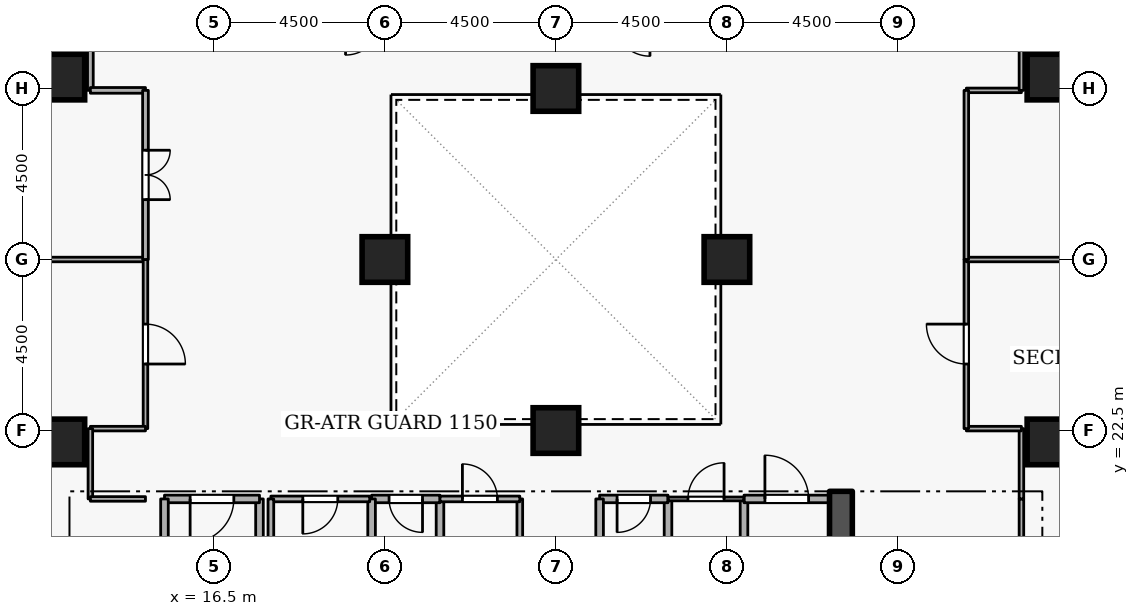
"""IFC4 building model, lengths in metres.
Left out: names, types, materials, properties, quantities, classifications, styles, units other than length and angle.
Written with IfcOpenShell. Run it as: python <this file> out.ifc"""

import sys

from ifc_helpers import new_model, si_unit, direction, frame, frame_2d, origin, origin_2d, place, context, subcontext, project, spatial, rectangle, extrude, element, fill, save


model = new_model("IFC4")
c1 = context("Model", 3, precision=1e-05, world=origin(), true_north=direction((0.0, 1.0)))
c2 = subcontext(c1, "Body", "Model", "MODEL_VIEW")
j1 = project(units=[si_unit("LENGTHUNIT", "METRE"), si_unit("PLANEANGLEUNIT", "RADIAN")], contexts=[c1])
p1 = place(None, origin())
s1 = spatial("IfcSite", under=j1, at=p1, CompositionType="ELEMENT")
p2 = place(p1, origin())
s2 = spatial("IfcBuilding", under=s1, at=p2, CompositionType="ELEMENT")
p3 = place(p2, frame((0.0, 0.0, 105.3)))
s3 = spatial("IfcBuildingStorey", under=s2, at=p3, CompositionType="ELEMENT", Elevation=105.3)
p4 = place(p3, frame((33.0, 15.2, 0.0), z_axis=(0.0, 0.0, 1.0), x_axis=(0.0, 1.0, 0.0)))
e1 = element("IfcWall", 1, at=p4, inside=s3, PredefinedType="SHEAR", context=c2, shape_type="SweptSolid", body=[
    extrude(rectangle(XDim=5.7, YDim=0.6, at=frame_2d((2.85, 0.0))), origin(), (0.0, 0.0, 1.0), 3.6),
])
for number, where, z_axis, x_axis in (
    (2, (12.5, 22.2, 0.0), (0.0, 0.0, 1.0), (1.0, 0.0, 0.0)),
    (3, (38.5, 22.2, 0.0), (0.0, 0.0, 1.0), (1.0, 0.0, 0.0)),
    (4, (12.5, 31.8, 0.0), (0.0, 0.0, 1.0), (1.0, 0.0, 0.0)),
    (5, (38.5, 31.8, 0.0), (0.0, 0.0, 1.0), (1.0, 0.0, 0.0)),
    (6, (25.5, 22.5, 0.0), (0.0, 0.0, 1.0), (1.0, 0.0, 0.0)),
    (7, (25.5, 31.5, 0.0), (0.0, 0.0, 1.0), (1.0, 0.0, 0.0)),
    (8, (21.0, 27.0, 0.0), (0.0, 0.0, 1.0), (1.0, 0.0, 0.0)),
    (9, (30.0, 27.0, 0.0), (0.0, 0.0, 1.0), (1.0, 0.0, 0.0)),
):
    element("IfcColumn", number, at=place(p3, frame(where, z_axis=z_axis, x_axis=x_axis)), inside=s3, PredefinedType="COLUMN", context=c2, shape_type="SweptSolid", body=[
        extrude(rectangle(XDim=1.2, YDim=1.2, at=origin_2d()), origin(), (0.0, 0.0, 1.0), 3.6),
    ])
p5 = place(p3, frame((17.7, 18.4, 0.0), z_axis=(0.0, 0.0, 1.0), x_axis=(0.0, 1.0, 0.0)))
e10 = element("IfcWall", 10, at=p5, inside=s3, PredefinedType="STANDARD", context=c2, shape_type="SweptSolid", body=[
    extrude(rectangle(XDim=2.3, YDim=0.2, at=frame_2d((1.15, 0.0))), origin(), (0.0, 0.0, 1.0), 2.545),
])
p6 = place(p3, frame((17.7, 20.7, 0.0), z_axis=(0.0, 0.0, 1.0), x_axis=(-1.0, 0.0, 0.0)))
e11 = element("IfcWall", 11, at=p6, inside=s3, PredefinedType="STANDARD", context=c2, shape_type="SweptSolid", body=[
    extrude(rectangle(XDim=2.5, YDim=0.2, at=frame_2d((1.25, 0.0))), origin(), (0.0, 0.0, 1.0), 3.34),
])
p7 = place(p6, frame((0.675, 0.0, 0.0)))
e12 = element("IfcOpeningElement", 12, at=p7, cuts=e11, PredefinedType="OPENING", context=c2, shape_type="SweptSolid", body=[
    extrude(rectangle(XDim=1.15, YDim=2.1, at=frame_2d((0.575, 1.05))), frame((0.0, 0.11, 0.0), z_axis=(0.0, -1.0, 0.0), x_axis=(1.0, 0.0, 0.0)), (0.0, 0.0, 1.0), 0.22),
])
p8 = place(p3, frame((15.2, 20.7, 0.0), z_axis=(0.0, 0.0, 1.0), x_axis=(0.0, -1.0, 0.0)))
e13 = element("IfcWall", 13, at=p8, inside=s3, PredefinedType="STANDARD", context=c2, shape_type="SweptSolid", body=[
    extrude(rectangle(XDim=5.7, YDim=0.2, at=frame_2d((2.85, 0.0))), origin(), (0.0, 0.0, 1.0), 3.34),
])
p9 = place(p3, frame((28.45, 18.65, 0.0), z_axis=(0.0, 0.0, 1.0), x_axis=(0.0, 1.0, 0.0)))
e14 = element("IfcWall", 14, at=p9, inside=s3, PredefinedType="STANDARD", context=c2, shape_type="SweptSolid", body=[
    extrude(rectangle(XDim=2.05, YDim=0.2, at=frame_2d((1.025, 0.0))), origin(), (0.0, 0.0, 1.0), 3.34),
])
p10 = place(p3, frame((28.45, 20.7, 0.0), z_axis=(0.0, 0.0, 1.0), x_axis=(-1.0, 0.0, 0.0)))
e15 = element("IfcWall", 15, at=p10, inside=s3, PredefinedType="STANDARD", context=c2, shape_type="SweptSolid", body=[
    extrude(rectangle(XDim=1.8, YDim=0.2, at=frame_2d((0.9, 0.0))), origin(), (0.0, 0.0, 1.0), 3.34),
])
p11 = place(p10, frame((0.46, 0.0, 0.0)))
e16 = element("IfcOpeningElement", 16, at=p11, cuts=e15, PredefinedType="OPENING", context=c2, shape_type="SweptSolid", body=[
    extrude(rectangle(XDim=0.88, YDim=2.04, at=frame_2d((0.44, 1.02))), frame((0.0, 0.11, 0.0), z_axis=(0.0, -1.0, 0.0), x_axis=(1.0, 0.0, 0.0)), (0.0, 0.0, 1.0), 0.22),
])
for number, where, z_axis, x_axis in (
    (17, (26.65, 20.7, 0.0), (0.0, 0.0, 1.0), (0.0, -1.0, 0.0)),
    (18, (22.45, 18.65, 0.0), (0.0, 0.0, 1.0), (0.0, 1.0, 0.0)),
):
    element("IfcWall", number, at=place(p3, frame(where, z_axis=z_axis, x_axis=x_axis)), inside=s3, PredefinedType="STANDARD", context=c2, shape_type="SweptSolid", body=[
        extrude(rectangle(XDim=2.05, YDim=0.2, at=frame_2d((1.025, 0.0))), origin(), (0.0, 0.0, 1.0), 3.34),
    ])
p12 = place(p3, frame((22.45, 20.7, 0.0), z_axis=(0.0, 0.0, 1.0), x_axis=(-1.0, 0.0, 0.0)))
e19 = element("IfcWall", 19, at=p12, inside=s3, PredefinedType="STANDARD", context=c2, shape_type="SweptSolid", body=[
    extrude(rectangle(XDim=1.8, YDim=0.2, at=frame_2d((0.9, 0.0))), origin(), (0.0, 0.0, 1.0), 3.34),
])
p13 = place(p12, frame((0.46, 0.0, 0.0)))
e20 = element("IfcOpeningElement", 20, at=p13, cuts=e19, PredefinedType="OPENING", context=c2, shape_type="SweptSolid", body=[
    extrude(rectangle(XDim=0.88, YDim=2.04, at=frame_2d((0.44, 1.02))), frame((0.0, 0.11, 0.0), z_axis=(0.0, -1.0, 0.0), x_axis=(1.0, 0.0, 0.0)), (0.0, 0.0, 1.0), 0.22),
])
for number, where, z_axis, x_axis in (
    (21, (20.65, 20.7, 0.0), (0.0, 0.0, 1.0), (0.0, -1.0, 0.0)),
    (22, (30.45, 18.65, 0.0), (0.0, 0.0, 1.0), (0.0, 1.0, 0.0)),
):
    element("IfcWall", number, at=place(p3, frame(where, z_axis=z_axis, x_axis=x_axis)), inside=s3, PredefinedType="STANDARD", context=c2, shape_type="SweptSolid", body=[
        extrude(rectangle(XDim=2.05, YDim=0.2, at=frame_2d((1.025, 0.0))), origin(), (0.0, 0.0, 1.0), 3.34),
    ])
p14 = place(p3, frame((30.45, 20.7, 0.0), z_axis=(0.0, 0.0, 1.0), x_axis=(1.0, 0.0, 0.0)))
e23 = element("IfcWall", 23, at=p14, inside=s3, PredefinedType="STANDARD", context=c2, shape_type="SweptSolid", body=[
    extrude(rectangle(XDim=2.25, YDim=0.2, at=frame_2d((1.125, 0.0))), origin(), (0.0, 0.0, 1.0), 3.34),
])
p15 = place(p14, frame((0.55, 0.0, 0.0)))
e24 = element("IfcOpeningElement", 24, at=p15, cuts=e23, PredefinedType="OPENING", context=c2, shape_type="SweptSolid", body=[
    extrude(rectangle(XDim=1.15, YDim=2.1, at=frame_2d((0.575, 1.05))), frame((0.0, 0.11, 0.0), z_axis=(0.0, -1.0, 0.0), x_axis=(1.0, 0.0, 0.0)), (0.0, 0.0, 1.0), 0.22),
])
p16 = place(p3, frame((20.6, 20.7, 0.0), z_axis=(0.0, 0.0, 1.0), x_axis=(-1.0, 0.0, 0.0)))
e25 = element("IfcWall", 25, at=p16, inside=s3, PredefinedType="PARTITIONING", context=c2, shape_type="SweptSolid", body=[
    extrude(rectangle(XDim=2.6, YDim=0.15, at=frame_2d((1.3, 0.0))), origin(), (0.0, 0.0, 1.0), 3.34),
])
p17 = place(p16, frame((0.84, 0.0, 0.0)))
e26 = element("IfcOpeningElement", 26, at=p17, cuts=e25, PredefinedType="OPENING", context=c2, shape_type="SweptSolid", body=[
    extrude(rectangle(XDim=0.92, YDim=2.08, at=frame_2d((0.46, 1.04))), frame((0.0, 0.085, 0.0), z_axis=(0.0, -1.0, 0.0), x_axis=(1.0, 0.0, 0.0)), (0.0, 0.0, 1.0), 0.17),
])
p18 = place(p3, frame((18.0, 20.7, 0.0), z_axis=(0.0, 0.0, 1.0), x_axis=(0.0, -1.0, 0.0)))
e27 = element("IfcWall", 27, at=p18, inside=s3, PredefinedType="PARTITIONING", context=c2, shape_type="SweptSolid", body=[
    extrude(rectangle(XDim=2.05, YDim=0.15, at=frame_2d((1.025, 0.0))), origin(), (0.0, 0.0, 1.0), 2.545),
])
p19 = place(p3, frame((24.55, 20.7, 0.0), z_axis=(0.0, 0.0, 1.0), x_axis=(0.0, -1.0, 0.0)))
e28 = element("IfcWall", 28, at=p19, inside=s3, PredefinedType="PARTITIONING", context=c2, shape_type="SweptSolid", body=[
    extrude(rectangle(XDim=2.05, YDim=0.15, at=frame_2d((1.025, 0.0))), origin(), (0.0, 0.0, 1.0), 3.34),
])
p20 = place(p3, frame((22.45, 20.7, 0.0), z_axis=(0.0, 0.0, 1.0), x_axis=(1.0, 0.0, 0.0)))
e29 = element("IfcWall", 29, at=p20, inside=s3, PredefinedType="PARTITIONING", context=c2, shape_type="SweptSolid", body=[
    extrude(rectangle(XDim=2.1, YDim=0.15, at=frame_2d((1.05, 0.0))), origin(), (0.0, 0.0, 1.0), 3.34),
])
p21 = place(p20, frame((0.59, 0.0, 0.0)))
e30 = element("IfcOpeningElement", 30, at=p21, cuts=e29, PredefinedType="OPENING", context=c2, shape_type="SweptSolid", body=[
    extrude(rectangle(XDim=0.92, YDim=2.08, at=frame_2d((0.46, 1.04))), frame((0.0, 0.085, 0.0), z_axis=(0.0, -1.0, 0.0), x_axis=(1.0, 0.0, 0.0)), (0.0, 0.0, 1.0), 0.17),
])
p22 = place(p3, frame((28.45, 20.7, 0.0), z_axis=(0.0, 0.0, 1.0), x_axis=(1.0, 0.0, 0.0)))
e31 = element("IfcWall", 31, at=p22, inside=s3, PredefinedType="PARTITIONING", context=c2, shape_type="SweptSolid", body=[
    extrude(rectangle(XDim=2.0, YDim=0.1, at=frame_2d((1.0, 0.0))), origin(), (0.0, 0.0, 1.0), 3.34),
])
p23 = place(p22, frame((0.525, 0.0, 0.0)))
e32 = element("IfcOpeningElement", 32, at=p23, cuts=e31, PredefinedType="OPENING", context=c2, shape_type="SweptSolid", body=[
    extrude(rectangle(XDim=0.95, YDim=2.1, at=frame_2d((0.475, 1.05))), frame((0.0, 0.06, 0.0), z_axis=(0.0, -1.0, 0.0), x_axis=(1.0, 0.0, 0.0)), (0.0, 0.0, 1.0), 0.12),
])
p24 = place(p3, frame((1.58, 27.0, 0.0), z_axis=(0.0, 0.0, 1.0), x_axis=(1.0, 0.0, 0.0)))
e33 = element("IfcWall", 33, at=p24, inside=s3, PredefinedType="PARTITIONING", context=c2, shape_type="SweptSolid", body=[
    extrude(rectangle(XDim=13.12, YDim=0.12, at=frame_2d((6.56, 0.0))), origin(), (0.0, 0.0, 1.0), 2.878),
])
p25 = place(p3, frame((14.7, 27.0, 0.0), z_axis=(0.0, 0.0, 1.0), x_axis=(0.0, -1.0, 0.0)))
e34 = element("IfcWall", 34, at=p25, inside=s3, PredefinedType="PARTITIONING", context=c2, shape_type="SweptSolid", body=[
    extrude(rectangle(XDim=4.45, YDim=0.12, at=frame_2d((2.225, 0.0))), origin(), (0.0, 0.0, 1.0), 3.34),
])
p26 = place(p25, frame((1.7, 0.0, 0.0)))
e35 = element("IfcOpeningElement", 35, at=p26, cuts=e34, PredefinedType="OPENING", context=c2, shape_type="SweptSolid", body=[
    extrude(rectangle(XDim=1.05, YDim=2.1, at=frame_2d((0.525, 1.05))), frame((0.0, 0.07, 0.0), z_axis=(0.0, -1.0, 0.0), x_axis=(1.0, 0.0, 0.0)), (0.0, 0.0, 1.0), 0.14),
])
p27 = place(p3, frame((14.7, 22.55, 0.0), z_axis=(0.0, 0.0, 1.0), x_axis=(-1.0, 0.0, 0.0)))
e36 = element("IfcWall", 36, at=p27, inside=s3, PredefinedType="PARTITIONING", context=c2, shape_type="SweptSolid", body=[
    extrude(rectangle(XDim=1.45, YDim=0.12, at=frame_2d((0.725, 0.0))), origin(), (0.0, 0.0, 1.0), 3.34),
])
p28 = place(p3, frame((13.25, 22.55, 0.0), z_axis=(0.0, 0.0, 1.0), x_axis=(0.0, -1.0, 0.0)))
e37 = element("IfcWall", 37, at=p28, inside=s3, PredefinedType="PARTITIONING", context=c2, shape_type="SweptSolid", body=[
    extrude(rectangle(XDim=1.85, YDim=0.12, at=frame_2d((0.925, 0.0))), origin(), (0.0, 0.0, 1.0), 3.34),
])
p29 = place(p3, frame((13.25, 20.7, 0.0), z_axis=(0.0, 0.0, 1.0), x_axis=(1.0, 0.0, 0.0)))
e38 = element("IfcWall", 38, at=p29, inside=s3, PredefinedType="PARTITIONING", context=c2, shape_type="SweptSolid", body=[
    extrude(rectangle(XDim=1.45, YDim=0.12, at=frame_2d((0.725, 0.0))), origin(), (0.0, 0.0, 1.0), 3.34),
])
p30 = place(p3, frame((13.25, 33.3, 0.0), z_axis=(0.0, 0.0, 1.0), x_axis=(0.0, -1.0, 0.0)))
e39 = element("IfcWall", 39, at=p30, inside=s3, PredefinedType="PARTITIONING", context=c2, shape_type="SweptSolid", body=[
    extrude(rectangle(XDim=1.85, YDim=0.15, at=frame_2d((0.925, 0.0))), origin(), (0.0, 0.0, 1.0), 3.34),
])
p31 = place(p3, frame((13.25, 31.45, 0.0), z_axis=(0.0, 0.0, 1.0), x_axis=(1.0, 0.0, 0.0)))
e40 = element("IfcWall", 40, at=p31, inside=s3, PredefinedType="PARTITIONING", context=c2, shape_type="SweptSolid", body=[
    extrude(rectangle(XDim=1.45, YDim=0.15, at=frame_2d((0.725, 0.0))), origin(), (0.0, 0.0, 1.0), 3.34),
])
p32 = place(p3, frame((14.7, 31.45, 0.0), z_axis=(0.0, 0.0, 1.0), x_axis=(0.0, -1.0, 0.0)))
e41 = element("IfcWall", 41, at=p32, inside=s3, PredefinedType="PARTITIONING", context=c2, shape_type="SweptSolid", body=[
    extrude(rectangle(XDim=4.45, YDim=0.15, at=frame_2d((2.225, 0.0))), origin(), (0.0, 0.0, 1.0), 3.34),
])
p33 = place(p32, frame((1.575, 0.0, 0.0)))
e42 = element("IfcOpeningElement", 42, at=p33, cuts=e41, PredefinedType="OPENING", context=c2, shape_type="SweptSolid", body=[
    extrude(rectangle(XDim=1.3, YDim=2.12, at=frame_2d((0.65, 1.06))), frame((0.0, 0.085, 0.0), z_axis=(0.0, -1.0, 0.0), x_axis=(1.0, 0.0, 0.0)), (0.0, 0.0, 1.0), 0.17),
])
p34 = place(p3, frame((37.75, 17.55, 0.0), z_axis=(0.0, 0.0, 1.0), x_axis=(0.0, 1.0, 0.0)))
e43 = element("IfcWall", 43, at=p34, inside=s3, PredefinedType="PARTITIONING", context=c2, shape_type="SweptSolid", body=[
    extrude(rectangle(XDim=3.15, YDim=0.12, at=frame_2d((1.575, 0.0))), origin(), (0.0, 0.0, 1.0), 3.34),
])
p35 = place(p3, frame((37.75, 20.7, 0.0), z_axis=(0.0, 0.0, 1.0), x_axis=(0.0, 1.0, 0.0)))
e44 = element("IfcWall", 44, at=p35, inside=s3, PredefinedType="PARTITIONING", context=c2, shape_type="SweptSolid", body=[
    extrude(rectangle(XDim=1.85, YDim=0.12, at=frame_2d((0.925, 0.0))), origin(), (0.0, 0.0, 1.0), 3.34),
])
p36 = place(p3, frame((37.75, 22.55, 0.0), z_axis=(0.0, 0.0, 1.0), x_axis=(-1.0, 0.0, 0.0)))
e45 = element("IfcWall", 45, at=p36, inside=s3, PredefinedType="PARTITIONING", context=c2, shape_type="SweptSolid", body=[
    extrude(rectangle(XDim=1.45, YDim=0.12, at=frame_2d((0.725, 0.0))), origin(), (0.0, 0.0, 1.0), 3.34),
])
p37 = place(p3, frame((36.3, 22.55, 0.0), z_axis=(0.0, 0.0, 1.0), x_axis=(0.0, 1.0, 0.0)))
e46 = element("IfcWall", 46, at=p37, inside=s3, PredefinedType="PARTITIONING", context=c2, shape_type="SweptSolid", body=[
    extrude(rectangle(XDim=4.45, YDim=0.12, at=frame_2d((2.225, 0.0))), origin(), (0.0, 0.0, 1.0), 3.34),
])
p38 = place(p37, frame((1.7, 0.0, 0.0)))
e47 = element("IfcOpeningElement", 47, at=p38, cuts=e46, PredefinedType="OPENING", context=c2, shape_type="SweptSolid", body=[
    extrude(rectangle(XDim=1.05, YDim=2.1, at=frame_2d((0.525, 1.05))), frame((0.0, 0.07, 0.0), z_axis=(0.0, -1.0, 0.0), x_axis=(1.0, 0.0, 0.0)), (0.0, 0.0, 1.0), 0.14),
])
p39 = place(p3, frame((36.3, 27.0, 0.0), z_axis=(0.0, 0.0, 1.0), x_axis=(1.0, 0.0, 0.0)))
e48 = element("IfcWall", 48, at=p39, inside=s3, PredefinedType="PARTITIONING", context=c2, shape_type="SweptSolid", body=[
    extrude(rectangle(XDim=7.12, YDim=0.12, at=frame_2d((3.56, 0.0))), origin(), (0.0, 0.0, 1.0), 2.878),
])
p40 = place(p3, frame((36.3, 31.45, 0.0), z_axis=(0.0, 0.0, 1.0), x_axis=(1.0, 0.0, 0.0)))
e49 = element("IfcWall", 49, at=p40, inside=s3, PredefinedType="PARTITIONING", context=c2, shape_type="SweptSolid", body=[
    extrude(rectangle(XDim=1.45, YDim=0.12, at=frame_2d((0.725, 0.0))), origin(), (0.0, 0.0, 1.0), 3.34),
])
p41 = place(p3, frame((37.75, 31.45, 0.0), z_axis=(0.0, 0.0, 1.0), x_axis=(0.0, 1.0, 0.0)))
e50 = element("IfcWall", 50, at=p41, inside=s3, PredefinedType="PARTITIONING", context=c2, shape_type="SweptSolid", body=[
    extrude(rectangle(XDim=1.85, YDim=0.12, at=frame_2d((0.925, 0.0))), origin(), (0.0, 0.0, 1.0), 3.34),
])
p42 = place(p3, frame((36.3, 27.0, 0.0), z_axis=(0.0, 0.0, 1.0), x_axis=(0.0, 1.0, 0.0)))
e51 = element("IfcWall", 51, at=p42, inside=s3, PredefinedType="PARTITIONING", context=c2, shape_type="SweptSolid", body=[
    extrude(rectangle(XDim=4.45, YDim=0.12, at=frame_2d((2.225, 0.0))), origin(), (0.0, 0.0, 1.0), 3.34),
])
p43 = place(p7, origin())
e52 = element("IfcDoor", 52, at=p43, inside=s3, OperationType="SINGLE_SWING_RIGHT", PredefinedType="DOOR", context=c2, shape_type="SweptSolid", body=[
    extrude(rectangle(XDim=1.15, YDim=2.1, at=frame_2d((0.575, 1.05))), frame((0.0, 0.025, 0.0), z_axis=(0.0, -1.0, 0.0), x_axis=(1.0, 0.0, 0.0)), (0.0, 0.0, 1.0), 0.05),
])
fill(e12, e52)
p44 = place(p11, origin())
e53 = element("IfcDoor", 53, at=p44, inside=s3, OperationType="SINGLE_SWING_RIGHT", PredefinedType="DOOR", context=c2, shape_type="SweptSolid", body=[
    extrude(rectangle(XDim=0.88, YDim=2.04, at=frame_2d((0.44, 1.02))), frame((0.0, 0.025, 0.0), z_axis=(0.0, -1.0, 0.0), x_axis=(1.0, 0.0, 0.0)), (0.0, 0.0, 1.0), 0.05),
])
fill(e16, e53)
p45 = place(p13, origin())
e54 = element("IfcDoor", 54, at=p45, inside=s3, OperationType="SINGLE_SWING_LEFT", PredefinedType="DOOR", context=c2, shape_type="SweptSolid", body=[
    extrude(rectangle(XDim=0.88, YDim=2.04, at=frame_2d((0.44, 1.02))), frame((0.0, 0.025, 0.0), z_axis=(0.0, -1.0, 0.0), x_axis=(1.0, 0.0, 0.0)), (0.0, 0.0, 1.0), 0.05),
])
fill(e20, e54)
p46 = place(p17, origin())
e55 = element("IfcDoor", 55, at=p46, inside=s3, OperationType="SINGLE_SWING_RIGHT", PredefinedType="DOOR", context=c2, shape_type="SweptSolid", body=[
    extrude(rectangle(XDim=0.92, YDim=2.08, at=frame_2d((0.46, 1.04))), frame((0.0, 0.025, 0.0), z_axis=(0.0, -1.0, 0.0), x_axis=(1.0, 0.0, 0.0)), (0.0, 0.0, 1.0), 0.05),
])
fill(e26, e55)
p47 = place(p21, origin())
e56 = element("IfcDoor", 56, at=p47, inside=s3, OperationType="SINGLE_SWING_LEFT", PredefinedType="DOOR", context=c2, shape_type="SweptSolid", body=[
    extrude(rectangle(XDim=0.92, YDim=2.08, at=frame_2d((0.46, 1.04))), frame((0.0, 0.025, 0.0), z_axis=(0.0, -1.0, 0.0), x_axis=(1.0, 0.0, 0.0)), (0.0, 0.0, 1.0), 0.05),
])
fill(e30, e56)
p48 = place(p23, origin())
e57 = element("IfcDoor", 57, at=p48, inside=s3, OperationType="SINGLE_SWING_RIGHT", PredefinedType="DOOR", context=c2, shape_type="SweptSolid", body=[
    extrude(rectangle(XDim=0.95, YDim=2.1, at=frame_2d((0.475, 1.05))), frame((0.0, 0.025, 0.0), z_axis=(0.0, -1.0, 0.0), x_axis=(1.0, 0.0, 0.0)), (0.0, 0.0, 1.0), 0.05),
])
fill(e32, e57)
p49 = place(p15, origin())
e58 = element("IfcDoor", 58, at=p49, inside=s3, OperationType="SINGLE_SWING_LEFT", PredefinedType="DOOR", context=c2, shape_type="SweptSolid", body=[
    extrude(rectangle(XDim=1.15, YDim=2.1, at=frame_2d((0.575, 1.05))), frame((0.0, 0.025, 0.0), z_axis=(0.0, -1.0, 0.0), x_axis=(1.0, 0.0, 0.0)), (0.0, 0.0, 1.0), 0.05),
])
fill(e24, e58)
p50 = place(p26, origin())
e59 = element("IfcDoor", 59, at=p50, inside=s3, OperationType="SINGLE_SWING_RIGHT", PredefinedType="DOOR", context=c2, shape_type="SweptSolid", body=[
    extrude(rectangle(XDim=1.05, YDim=2.1, at=frame_2d((0.525, 1.05))), frame((0.0, 0.025, 0.0), z_axis=(0.0, -1.0, 0.0), x_axis=(1.0, 0.0, 0.0)), (0.0, 0.0, 1.0), 0.05),
])
fill(e35, e59)
p51 = place(p33, origin())
e60 = element("IfcDoor", 60, at=p51, inside=s3, OperationType="DOUBLE_DOOR_SINGLE_SWING", PredefinedType="DOOR", context=c2, shape_type="SweptSolid", body=[
    extrude(rectangle(XDim=1.3, YDim=2.12, at=frame_2d((0.65, 1.06))), frame((0.0, 0.025, 0.0), z_axis=(0.0, -1.0, 0.0), x_axis=(1.0, 0.0, 0.0)), (0.0, 0.0, 1.0), 0.05),
])
fill(e42, e60)
p52 = place(p38, origin())
e61 = element("IfcDoor", 61, at=p52, inside=s3, OperationType="SINGLE_SWING_RIGHT", PredefinedType="DOOR", context=c2, shape_type="SweptSolid", body=[
    extrude(rectangle(XDim=1.05, YDim=2.1, at=frame_2d((0.525, 1.05))), frame((0.0, 0.025, 0.0), z_axis=(0.0, -1.0, 0.0), x_axis=(1.0, 0.0, 0.0)), (0.0, 0.0, 1.0), 0.05),
])
fill(e47, e61)
save(model, sys.argv[1])
